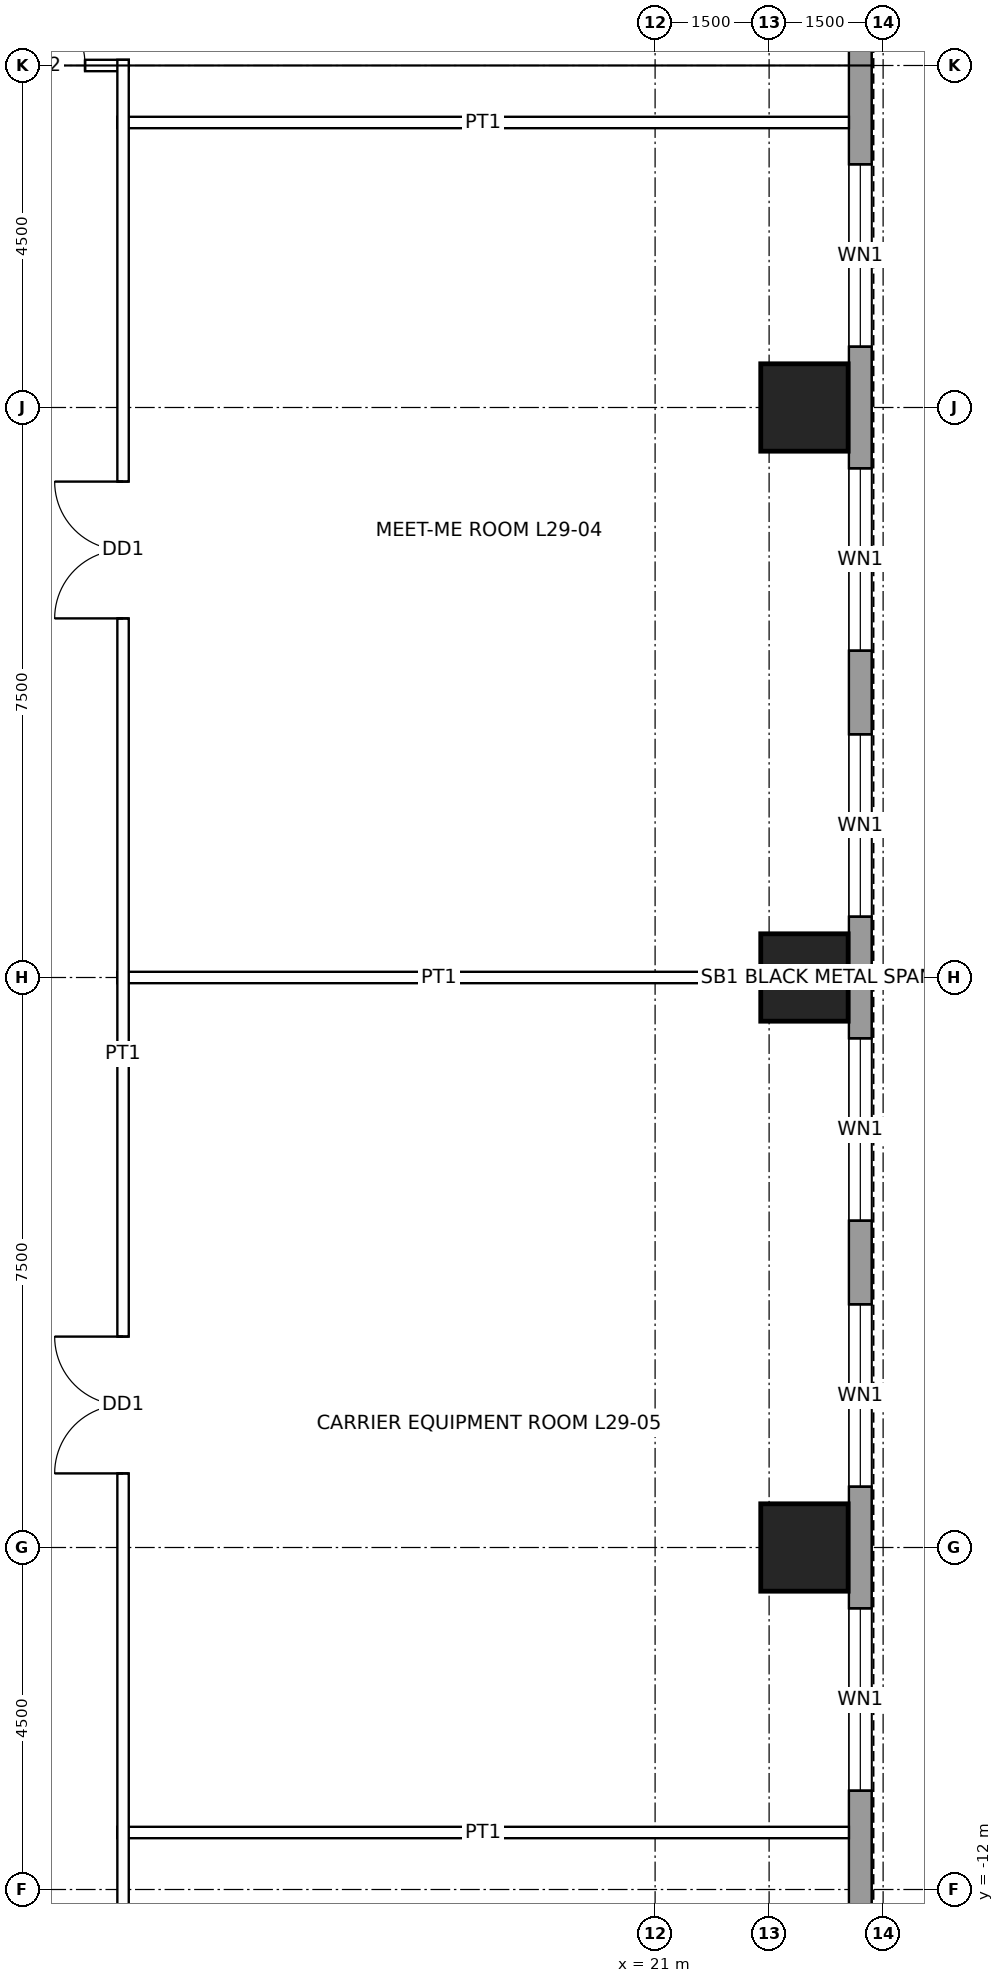
"""IFC4 building model, lengths in metres.
Left out: names, types, materials, properties, quantities, classifications, styles, units other than length and angle.
Written with IfcOpenShell. Run it as: python <this file> out.ifc"""

import sys

from ifc_helpers import new_model, si_unit, direction, frame, frame_2d, origin, origin_2d, place, context, subcontext, project, spatial, rectangle, hollow_rectangle, extrude, element, fill, save


model = new_model("IFC4")
c1 = context("Model", 3, precision=1e-05, world=origin(), true_north=direction((0.0, 1.0)))
c2 = subcontext(c1, "Body", "Model", "MODEL_VIEW")
j1 = project(units=[si_unit("LENGTHUNIT", "METRE"), si_unit("PLANEANGLEUNIT", "RADIAN")], contexts=[c1])
p1 = place(None, origin())
s1 = spatial("IfcSite", under=j1, at=p1, CompositionType="ELEMENT")
p2 = place(p1, origin())
s2 = spatial("IfcBuilding", under=s1, at=p2, CompositionType="ELEMENT")
p3 = place(p2, frame((0.0, 0.0, 144.9)))
s3 = spatial("IfcBuildingStorey", under=s2, at=p3, CompositionType="ELEMENT", Elevation=144.9)
for number, where, z_axis, x_axis in (
    (1, (22.965, 7.5, 0.0), (0.0, 0.0, 1.0), (1.0, 0.0, 0.0)),
    (2, (22.965, 0.0, 0.0), (0.0, 0.0, 1.0), (1.0, 0.0, 0.0)),
    (3, (22.965, -7.5, 0.0), (0.0, 0.0, 1.0), (1.0, 0.0, 0.0)),
):
    element("IfcColumn", number, at=place(p3, frame(where, z_axis=z_axis, x_axis=x_axis)), inside=s3, PredefinedType="COLUMN", context=c2, shape_type="SweptSolid", body=[
        extrude(hollow_rectangle(XDim=1.15, YDim=1.15, WallThickness=0.075, at=origin_2d()), origin(), (0.0, 0.0, 1.0), 4.5),
    ])
p4 = place(p3, frame((23.7, 16.2, 0.0), z_axis=(0.0, 0.0, 1.0), x_axis=(0.0, -1.0, 0.0)))
e4 = element("IfcWall", 4, at=p4, inside=s3, PredefinedType="SOLIDWALL", context=c2, shape_type="SweptSolid", body=[
    extrude(rectangle(XDim=32.4, YDim=0.3, at=frame_2d((16.2, 0.0))), origin(), (0.0, 0.0, 1.0), 4.3),
])
p5 = place(p4, frame((0.95, 0.0, 1.0)))
e5 = element("IfcOpeningElement", 5, at=p5, cuts=e4, PredefinedType="OPENING", context=c2, shape_type="SweptSolid", body=[
    extrude(rectangle(XDim=1.8, YDim=1.2, at=frame_2d((0.9, 0.6))), frame((0.0, 0.16, 0.0), z_axis=(0.0, -1.0, 0.0), x_axis=(1.0, 0.0, 0.0)), (0.0, 0.0, 1.0), 0.32),
])
p6 = place(p4, frame((5.5, 0.0, 1.0)))
e6 = element("IfcOpeningElement", 6, at=p6, cuts=e4, PredefinedType="OPENING", context=c2, shape_type="SweptSolid", body=[
    extrude(rectangle(XDim=2.4, YDim=1.2, at=frame_2d((1.2, 0.6))), frame((0.0, 0.16, 0.0), z_axis=(0.0, -1.0, 0.0), x_axis=(1.0, 0.0, 0.0)), (0.0, 0.0, 1.0), 0.32),
])
p7 = place(p4, frame((9.5, 0.0, 1.0)))
e7 = element("IfcOpeningElement", 7, at=p7, cuts=e4, PredefinedType="OPENING", context=c2, shape_type="SweptSolid", body=[
    extrude(rectangle(XDim=2.4, YDim=1.2, at=frame_2d((1.2, 0.6))), frame((0.0, 0.16, 0.0), z_axis=(0.0, -1.0, 0.0), x_axis=(1.0, 0.0, 0.0)), (0.0, 0.0, 1.0), 0.32),
])
p8 = place(p4, frame((13.0, 0.0, 1.0)))
e8 = element("IfcOpeningElement", 8, at=p8, cuts=e4, PredefinedType="OPENING", context=c2, shape_type="SweptSolid", body=[
    extrude(rectangle(XDim=2.4, YDim=1.2, at=frame_2d((1.2, 0.6))), frame((0.0, 0.16, 0.0), z_axis=(0.0, -1.0, 0.0), x_axis=(1.0, 0.0, 0.0)), (0.0, 0.0, 1.0), 0.32),
])
p9 = place(p4, frame((17.0, 0.0, 1.0)))
e9 = element("IfcOpeningElement", 9, at=p9, cuts=e4, PredefinedType="OPENING", context=c2, shape_type="SweptSolid", body=[
    extrude(rectangle(XDim=2.4, YDim=1.2, at=frame_2d((1.2, 0.6))), frame((0.0, 0.16, 0.0), z_axis=(0.0, -1.0, 0.0), x_axis=(1.0, 0.0, 0.0)), (0.0, 0.0, 1.0), 0.32),
])
p10 = place(p4, frame((20.5, 0.0, 1.0)))
e10 = element("IfcOpeningElement", 10, at=p10, cuts=e4, PredefinedType="OPENING", context=c2, shape_type="SweptSolid", body=[
    extrude(rectangle(XDim=2.4, YDim=1.2, at=frame_2d((1.2, 0.6))), frame((0.0, 0.16, 0.0), z_axis=(0.0, -1.0, 0.0), x_axis=(1.0, 0.0, 0.0)), (0.0, 0.0, 1.0), 0.32),
])
p11 = place(p4, frame((24.5, 0.0, 1.0)))
e11 = element("IfcOpeningElement", 11, at=p11, cuts=e4, PredefinedType="OPENING", context=c2, shape_type="SweptSolid", body=[
    extrude(rectangle(XDim=2.4, YDim=1.2, at=frame_2d((1.2, 0.6))), frame((0.0, 0.16, 0.0), z_axis=(0.0, -1.0, 0.0), x_axis=(1.0, 0.0, 0.0)), (0.0, 0.0, 1.0), 0.32),
])
p12 = place(p4, frame((29.65, 0.0, 1.0)))
e12 = element("IfcOpeningElement", 12, at=p12, cuts=e4, PredefinedType="OPENING", context=c2, shape_type="SweptSolid", body=[
    extrude(rectangle(XDim=1.8, YDim=1.2, at=frame_2d((0.9, 0.6))), frame((0.0, 0.16, 0.0), z_axis=(0.0, -1.0, 0.0), x_axis=(1.0, 0.0, 0.0)), (0.0, 0.0, 1.0), 0.32),
])
p13 = place(p3, frame((13.925, -11.25, 0.0), z_axis=(0.0, 0.0, 1.0), x_axis=(1.0, 0.0, 0.0)))
e13 = element("IfcWall", 13, at=p13, inside=s3, PredefinedType="PARTITIONING", context=c2, shape_type="SweptSolid", body=[
    extrude(rectangle(XDim=9.625, YDim=0.15, at=frame_2d((4.812, 0.0))), origin(), (0.0, 0.0, 1.0), 3.431),
])
p14 = place(p3, frame((13.925, 0.0, 0.0), z_axis=(0.0, 0.0, 1.0), x_axis=(1.0, 0.0, 0.0)))
e14 = element("IfcWall", 14, at=p14, inside=s3, PredefinedType="PARTITIONING", context=c2, shape_type="SweptSolid", body=[
    extrude(rectangle(XDim=8.465, YDim=0.15, at=frame_2d((4.232, 0.0))), origin(), (0.0, 0.0, 1.0), 3.431),
])
p15 = place(p3, frame((13.925, 11.25, 0.0), z_axis=(0.0, 0.0, 1.0), x_axis=(1.0, 0.0, 0.0)))
e15 = element("IfcWall", 15, at=p15, inside=s3, PredefinedType="PARTITIONING", context=c2, shape_type="SweptSolid", body=[
    extrude(rectangle(XDim=9.625, YDim=0.15, at=frame_2d((4.812, 0.0))), origin(), (0.0, 0.0, 1.0), 3.431),
])
p16 = place(p3, frame((12.0, 12.0, 0.0), z_axis=(0.0, 0.0, 1.0), x_axis=(1.0, 0.0, 0.0)))
e16 = element("IfcWall", 16, at=p16, inside=s3, PredefinedType="PARTITIONING", context=c2, shape_type="SweptSolid", body=[
    extrude(rectangle(XDim=2.075, YDim=0.15, at=frame_2d((1.038, 0.0))), origin(), (0.0, 0.0, 1.0), 3.284),
])
p17 = place(p16, frame((0.5, 0.0, 0.0)))
e17 = element("IfcOpeningElement", 17, at=p17, cuts=e16, PredefinedType="OPENING", context=c2, shape_type="SweptSolid", body=[
    extrude(rectangle(XDim=1.0, YDim=2.1, at=frame_2d((0.5, 1.05))), frame((0.0, 0.085, 0.0), z_axis=(0.0, -1.0, 0.0), x_axis=(1.0, 0.0, 0.0)), (0.0, 0.0, 1.0), 0.17),
])
p18 = place(p3, frame((14.0, -14.075, 0.0), z_axis=(0.0, 0.0, 1.0), x_axis=(0.0, 1.0, 0.0)))
e18 = element("IfcWall", 18, at=p18, inside=s3, PredefinedType="PARTITIONING", context=c2, shape_type="SweptSolid", body=[
    extrude(rectangle(XDim=26.15, YDim=0.15, at=frame_2d((13.075, 0.0))), origin(), (0.0, 0.0, 1.0), 4.3),
])
p19 = place(p18, frame((18.8, 0.0, 0.0)))
e19 = element("IfcOpeningElement", 19, at=p19, cuts=e18, PredefinedType="OPENING", context=c2, shape_type="SweptSolid", body=[
    extrude(rectangle(XDim=1.8, YDim=2.4, at=frame_2d((0.9, 1.2))), frame((0.0, 0.085, 0.0), z_axis=(0.0, -1.0, 0.0), x_axis=(1.0, 0.0, 0.0)), (0.0, 0.0, 1.0), 0.17),
])
p20 = place(p18, frame((7.55, 0.0, 0.0)))
e20 = element("IfcOpeningElement", 20, at=p20, cuts=e18, PredefinedType="OPENING", context=c2, shape_type="SweptSolid", body=[
    extrude(rectangle(XDim=1.8, YDim=2.4, at=frame_2d((0.9, 1.2))), frame((0.0, 0.085, 0.0), z_axis=(0.0, -1.0, 0.0), x_axis=(1.0, 0.0, 0.0)), (0.0, 0.0, 1.0), 0.17),
])
p21 = place(p6, origin())
e21 = element("IfcWindow", 21, at=p21, inside=s3, PartitioningType="SINGLE_PANEL", PredefinedType="WINDOW", context=c2, shape_type="SweptSolid", body=[
    extrude(rectangle(XDim=2.4, YDim=1.2, at=frame_2d((1.2, 0.6))), frame((0.0, 0.03, 0.0), z_axis=(0.0, -1.0, 0.0), x_axis=(1.0, 0.0, 0.0)), (0.0, 0.0, 1.0), 0.06),
])
fill(e6, e21)
p22 = place(p7, origin())
e22 = element("IfcWindow", 22, at=p22, inside=s3, PartitioningType="SINGLE_PANEL", PredefinedType="WINDOW", context=c2, shape_type="SweptSolid", body=[
    extrude(rectangle(XDim=2.4, YDim=1.2, at=frame_2d((1.2, 0.6))), frame((0.0, 0.03, 0.0), z_axis=(0.0, -1.0, 0.0), x_axis=(1.0, 0.0, 0.0)), (0.0, 0.0, 1.0), 0.06),
])
fill(e7, e22)
p23 = place(p8, origin())
e23 = element("IfcWindow", 23, at=p23, inside=s3, PartitioningType="SINGLE_PANEL", PredefinedType="WINDOW", context=c2, shape_type="SweptSolid", body=[
    extrude(rectangle(XDim=2.4, YDim=1.2, at=frame_2d((1.2, 0.6))), frame((0.0, 0.03, 0.0), z_axis=(0.0, -1.0, 0.0), x_axis=(1.0, 0.0, 0.0)), (0.0, 0.0, 1.0), 0.06),
])
fill(e8, e23)
p24 = place(p9, origin())
e24 = element("IfcWindow", 24, at=p24, inside=s3, PartitioningType="SINGLE_PANEL", PredefinedType="WINDOW", context=c2, shape_type="SweptSolid", body=[
    extrude(rectangle(XDim=2.4, YDim=1.2, at=frame_2d((1.2, 0.6))), frame((0.0, 0.03, 0.0), z_axis=(0.0, -1.0, 0.0), x_axis=(1.0, 0.0, 0.0)), (0.0, 0.0, 1.0), 0.06),
])
fill(e9, e24)
p25 = place(p10, origin())
e25 = element("IfcWindow", 25, at=p25, inside=s3, PartitioningType="SINGLE_PANEL", PredefinedType="WINDOW", context=c2, shape_type="SweptSolid", body=[
    extrude(rectangle(XDim=2.4, YDim=1.2, at=frame_2d((1.2, 0.6))), frame((0.0, 0.03, 0.0), z_axis=(0.0, -1.0, 0.0), x_axis=(1.0, 0.0, 0.0)), (0.0, 0.0, 1.0), 0.06),
])
fill(e10, e25)
p26 = place(p11, origin())
e26 = element("IfcWindow", 26, at=p26, inside=s3, PartitioningType="SINGLE_PANEL", PredefinedType="WINDOW", context=c2, shape_type="SweptSolid", body=[
    extrude(rectangle(XDim=2.4, YDim=1.2, at=frame_2d((1.2, 0.6))), frame((0.0, 0.03, 0.0), z_axis=(0.0, -1.0, 0.0), x_axis=(1.0, 0.0, 0.0)), (0.0, 0.0, 1.0), 0.06),
])
fill(e11, e26)
p27 = place(p19, origin())
e27 = element("IfcDoor", 27, at=p27, inside=s3, OperationType="DOUBLE_DOOR_SINGLE_SWING", PredefinedType="DOOR", context=c2, shape_type="SweptSolid", body=[
    extrude(rectangle(XDim=1.8, YDim=2.4, at=frame_2d((0.9, 1.2))), frame((0.0, 0.025, 0.0), z_axis=(0.0, -1.0, 0.0), x_axis=(1.0, 0.0, 0.0)), (0.0, 0.0, 1.0), 0.05),
])
fill(e19, e27)
p28 = place(p20, origin())
e28 = element("IfcDoor", 28, at=p28, inside=s3, OperationType="DOUBLE_DOOR_SINGLE_SWING", PredefinedType="DOOR", context=c2, shape_type="SweptSolid", body=[
    extrude(rectangle(XDim=1.8, YDim=2.4, at=frame_2d((0.9, 1.2))), frame((0.0, 0.025, 0.0), z_axis=(0.0, -1.0, 0.0), x_axis=(1.0, 0.0, 0.0)), (0.0, 0.0, 1.0), 0.05),
])
fill(e20, e28)
p29 = place(p17, origin())
e29 = element("IfcDoor", 29, at=p29, inside=s3, OperationType="SINGLE_SWING_LEFT", PredefinedType="DOOR", context=c2, shape_type="SweptSolid", body=[
    extrude(rectangle(XDim=1.0, YDim=2.1, at=frame_2d((0.5, 1.05))), frame((0.0, 0.025, 0.0), z_axis=(0.0, -1.0, 0.0), x_axis=(1.0, 0.0, 0.0)), (0.0, 0.0, 1.0), 0.05),
])
fill(e17, e29)
save(model, sys.argv[1])
